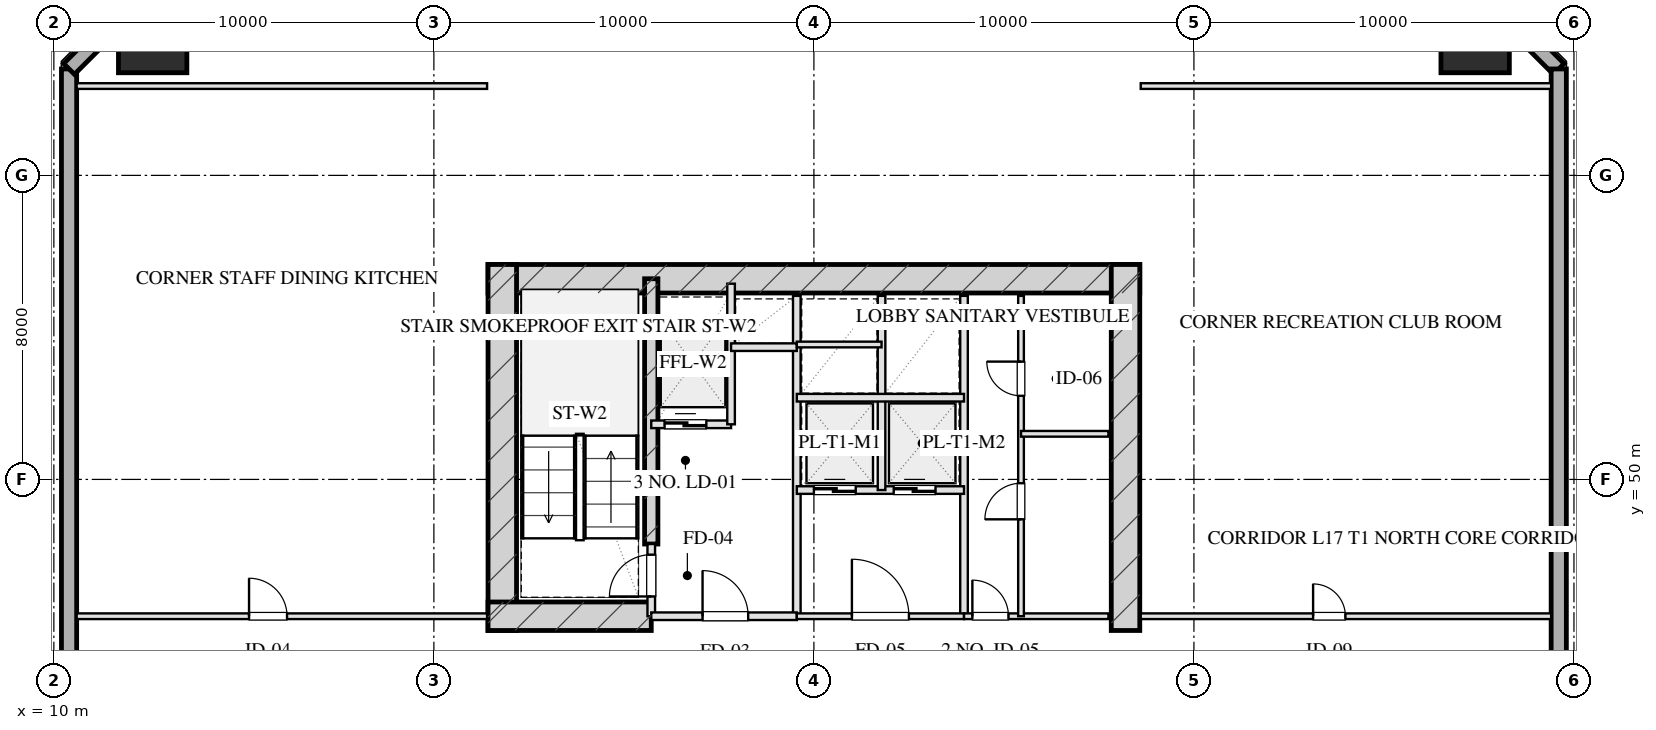
"""IFC4 building model, lengths in metres.
Left out: names, types, materials, properties, quantities, classifications, styles, units other than length and angle.
Written with IfcOpenShell. Run it as: python <this file> out.ifc"""

import sys

from ifc_helpers import new_model, si_unit, direction, frame, frame_2d, origin, origin_2d, place, context, subcontext, project, spatial, rectangle, hollow_rectangle, extrude, element, fill, save


model = new_model("IFC4")
c1 = context("Model", 3, precision=1e-05, world=origin(), true_north=direction((0.0, 1.0)))
c2 = subcontext(c1, "Body", "Model", "MODEL_VIEW")
j1 = project(units=[si_unit("LENGTHUNIT", "METRE"), si_unit("PLANEANGLEUNIT", "RADIAN")], contexts=[c1])
p1 = place(None, origin())
s1 = spatial("IfcSite", under=j1, at=p1, CompositionType="ELEMENT")
p2 = place(p1, origin())
s2 = spatial("IfcBuilding", under=s1, at=p2, CompositionType="ELEMENT")
p3 = place(p2, frame((0.0, 0.0, 71.3)))
s3 = spatial("IfcBuildingStorey", under=s2, at=p3, CompositionType="ELEMENT", Elevation=71.3)
p4 = place(p3, frame((21.425, 55.28, 0.0), z_axis=(0.0, 0.0, 1.0), x_axis=(1.0, 0.0, 0.0)))
e1 = element("IfcWall", 1, at=p4, inside=s3, PredefinedType="SHEAR", context=c2, shape_type="SweptSolid", body=[
    extrude(rectangle(XDim=17.15, YDim=0.75, at=frame_2d((8.575, 0.0))), origin(), (0.0, 0.0, 1.0), 3.45),
])
for number, where, z_axis, x_axis in (
    (2, (21.8, 46.025, 0.0), (0.0, 0.0, 1.0), (0.0, 1.0, 0.0)),
    (3, (38.2, 46.025, 0.0), (0.0, 0.0, 1.0), (0.0, 1.0, 0.0)),
):
    element("IfcWall", number, at=place(p3, frame(where, z_axis=z_axis, x_axis=x_axis)), inside=s3, PredefinedType="SHEAR", context=c2, shape_type="SweptSolid", body=[
        extrude(rectangle(XDim=9.63, YDim=0.75, at=frame_2d((4.815, 0.0))), origin(), (0.0, 0.0, 1.0), 3.45),
    ])
p5 = place(p3, frame((25.72, 48.3, 0.0), z_axis=(0.0, 0.0, 1.0), x_axis=(0.0, 1.0, 0.0)))
e4 = element("IfcWall", 4, at=p5, inside=s3, PredefinedType="SHEAR", context=c2, shape_type="SweptSolid", body=[
    extrude(rectangle(XDim=6.98, YDim=0.35, at=frame_2d((3.49, 0.0))), origin(), (0.0, 0.0, 1.0), 3.45),
])
p6 = place(p3, frame((21.425, 46.4, 0.0), z_axis=(0.0, 0.0, 1.0), x_axis=(1.0, 0.0, 0.0)))
e5 = element("IfcWall", 5, at=p6, inside=s3, PredefinedType="SHEAR", context=c2, shape_type="SweptSolid", body=[
    extrude(rectangle(XDim=4.295, YDim=0.75, at=frame_2d((2.147, 0.0))), origin(), (0.0, 0.0, 1.0), 3.45),
])
for number, where, z_axis, x_axis in (
    (6, (47.4, 61.6, 0.0), (0.0, 0.0, 1.0), (1.0, 0.0, 0.0)),
    (7, (12.6, 61.6, 0.0), (0.0, 0.0, 1.0), (1.0, 0.0, 0.0)),
):
    element("IfcColumn", number, at=place(p3, frame(where, z_axis=z_axis, x_axis=x_axis)), inside=s3, PredefinedType="COLUMN", context=c2, shape_type="SweptSolid", body=[
        extrude(hollow_rectangle(XDim=1.8, YDim=1.8, WallThickness=0.06, at=origin_2d()), origin(), (0.0, 0.0, 1.0), 3.451),
    ])
p7 = place(p3, frame((10.4, 7.2, 0.0), z_axis=(0.0, 0.0, 1.0), x_axis=(0.0, 1.0, 0.0)))
e8 = element("IfcWall", 8, at=p7, inside=s3, PredefinedType="SOLIDWALL", context=c2, shape_type="SweptSolid", body=[
    extrude(rectangle(XDim=53.6, YDim=0.4, at=frame_2d((26.8, 0.0))), origin(), (0.0, 0.0, 1.0), 2.61),
])
p8 = place(p7, frame((19.15, 0.0, 0.75)))
e9 = element("IfcOpeningElement", 9, at=p8, cuts=e8, PredefinedType="OPENING", context=c2, shape_type="SweptSolid", body=[
    extrude(rectangle(XDim=2.5, YDim=1.46, at=frame_2d((1.25, 0.73))), frame((0.0, 0.21, 0.0), z_axis=(0.0, -1.0, 0.0), x_axis=(1.0, 0.0, 0.0)), (0.0, 0.0, 1.0), 0.42),
])
p9 = place(p7, frame((32.05, 0.0, 0.0)))
e10 = element("IfcOpeningElement", 10, at=p9, cuts=e8, PredefinedType="OPENING", context=c2, shape_type="SweptSolid", body=[
    extrude(rectangle(XDim=1.1, YDim=2.15, at=frame_2d((0.55, 1.075))), frame((0.0, 0.21, 0.0), z_axis=(0.0, -1.0, 0.0), x_axis=(1.0, 0.0, 0.0)), (0.0, 0.0, 1.0), 0.42),
])
for number, where, z_axis, x_axis in (
    (11, (10.4, 60.8, 0.0), (0.0, 0.0, 1.0), (0.707, 0.707, 0.0)),
    (12, (46.6, 63.8, 0.0), (0.0, 0.0, 1.0), (0.707, -0.707, 0.0)),
):
    element("IfcWall", number, at=place(p3, frame(where, z_axis=z_axis, x_axis=x_axis)), inside=s3, PredefinedType="SOLIDWALL", context=c2, shape_type="SweptSolid", body=[
        extrude(rectangle(XDim=4.243, YDim=0.4, at=frame_2d((2.121, 0.0))), origin(), (0.0, 0.0, 1.0), 2.61),
    ])
p10 = place(p3, frame((49.6, 60.8, 0.0), z_axis=(0.0, 0.0, 1.0), x_axis=(0.0, -1.0, 0.0)))
e13 = element("IfcWall", 13, at=p10, inside=s3, PredefinedType="SOLIDWALL", context=c2, shape_type="SweptSolid", body=[
    extrude(rectangle(XDim=53.6, YDim=0.4, at=frame_2d((26.8, 0.0))), origin(), (0.0, 0.0, 1.0), 2.61),
])
p11 = place(p10, frame((28.15, 0.0, 0.75)))
e14 = element("IfcOpeningElement", 14, at=p11, cuts=e13, PredefinedType="OPENING", context=c2, shape_type="SweptSolid", body=[
    extrude(rectangle(XDim=2.5, YDim=1.46, at=frame_2d((1.25, 0.73))), frame((0.0, 0.21, 0.0), z_axis=(0.0, -1.0, 0.0), x_axis=(1.0, 0.0, 0.0)), (0.0, 0.0, 1.0), 0.42),
])
p12 = place(p10, frame((23.15, 0.0, 0.0)))
e15 = element("IfcOpeningElement", 15, at=p12, cuts=e13, PredefinedType="OPENING", context=c2, shape_type="SweptSolid", body=[
    extrude(rectangle(XDim=1.1, YDim=2.15, at=frame_2d((0.55, 1.075))), frame((0.0, 0.21, 0.0), z_axis=(0.0, -1.0, 0.0), x_axis=(1.0, 0.0, 0.0)), (0.0, 0.0, 1.0), 0.42),
])
p13 = place(p3, frame((25.72, 46.4, 0.0), z_axis=(0.0, 0.0, 1.0), x_axis=(0.0, 1.0, 0.0)))
e16 = element("IfcWall", 16, at=p13, inside=s3, PredefinedType="PARTITIONING", context=c2, shape_type="SweptSolid", body=[
    extrude(rectangle(XDim=1.9, YDim=0.2, at=frame_2d((0.95, 0.0))), origin(), (0.0, 0.0, 1.0), 3.175),
])
p14 = place(p13, frame((0.52, 0.0, 0.0)))
e17 = element("IfcOpeningElement", 17, at=p14, cuts=e16, PredefinedType="OPENING", context=c2, shape_type="SweptSolid", body=[
    extrude(rectangle(XDim=1.1, YDim=2.05, at=frame_2d((0.55, 1.025))), frame((0.0, 0.11, 0.0), z_axis=(0.0, -1.0, 0.0), x_axis=(1.0, 0.0, 0.0)), (0.0, 0.0, 1.0), 0.22),
])
p15 = place(p3, frame((29.55, 46.4, 0.0), z_axis=(0.0, 0.0, 1.0), x_axis=(0.0, 1.0, 0.0)))
e18 = element("IfcWall", 18, at=p15, inside=s3, PredefinedType="PARTITIONING", context=c2, shape_type="SweptSolid", body=[
    extrude(rectangle(XDim=8.43, YDim=0.2, at=frame_2d((4.215, 0.0))), origin(), (0.0, 0.0, 1.0), 3.175),
])
p16 = place(p3, frame((25.72, 46.4, 0.0), z_axis=(0.0, 0.0, 1.0), x_axis=(1.0, 0.0, 0.0)))
e19 = element("IfcWall", 19, at=p16, inside=s3, PredefinedType="PARTITIONING", context=c2, shape_type="SweptSolid", body=[
    extrude(rectangle(XDim=3.83, YDim=0.2, at=frame_2d((1.915, 0.0))), origin(), (0.0, 0.0, 1.0), 3.175),
])
p17 = place(p16, frame((1.35, 0.0, 0.0)))
e20 = element("IfcOpeningElement", 20, at=p17, cuts=e19, PredefinedType="OPENING", context=c2, shape_type="SweptSolid", body=[
    extrude(rectangle(XDim=1.2, YDim=2.05, at=frame_2d((0.6, 1.025))), frame((0.0, 0.11, 0.0), z_axis=(0.0, -1.0, 0.0), x_axis=(1.0, 0.0, 0.0)), (0.0, 0.0, 1.0), 0.22),
])
p18 = place(p3, frame((25.72, 51.45, 0.0), z_axis=(0.0, 0.0, 1.0), x_axis=(1.0, 0.0, 0.0)))
e21 = element("IfcWall", 21, at=p18, inside=s3, PredefinedType="PARTITIONING", context=c2, shape_type="SweptSolid", body=[
    extrude(rectangle(XDim=2.1, YDim=0.2, at=frame_2d((1.05, 0.0))), origin(), (0.0, 0.0, 1.0), 3.175),
])
p19 = place(p18, frame((0.35, 0.0, 0.0)))
e22 = element("IfcOpeningElement", 22, at=p19, cuts=e21, PredefinedType="OPENING", context=c2, shape_type="SweptSolid", body=[
    extrude(rectangle(XDim=1.1, YDim=2.05, at=frame_2d((0.55, 1.025))), frame((0.0, 0.11, 0.0), z_axis=(0.0, -1.0, 0.0), x_axis=(1.0, 0.0, 0.0)), (0.0, 0.0, 1.0), 0.22),
])
p20 = place(p3, frame((27.82, 51.45, 0.0), z_axis=(0.0, 0.0, 1.0), x_axis=(0.0, 1.0, 0.0)))
e23 = element("IfcWall", 23, at=p20, inside=s3, PredefinedType="PARTITIONING", context=c2, shape_type="SweptSolid", body=[
    extrude(rectangle(XDim=3.7, YDim=0.2, at=frame_2d((1.85, 0.0))), origin(), (0.0, 0.0, 1.0), 3.175),
])
p21 = place(p3, frame((27.82, 53.48, 0.0), z_axis=(0.0, 0.0, 1.0), x_axis=(1.0, 0.0, 0.0)))
e24 = element("IfcWall", 24, at=p21, inside=s3, PredefinedType="PARTITIONING", context=c2, shape_type="SweptSolid", body=[
    extrude(rectangle(XDim=1.73, YDim=0.2, at=frame_2d((0.865, 0.0))), origin(), (0.0, 0.0, 1.0), 3.175),
])
p22 = place(p3, frame((33.95, 46.4, 0.0), z_axis=(0.0, 0.0, 1.0), x_axis=(0.0, 1.0, 0.0)))
e25 = element("IfcWall", 25, at=p22, inside=s3, PredefinedType="PARTITIONING", context=c2, shape_type="SweptSolid", body=[
    extrude(rectangle(XDim=8.43, YDim=0.2, at=frame_2d((4.215, 0.0))), origin(), (0.0, 0.0, 1.0), 3.175),
])
p23 = place(p3, frame((29.55, 46.4, 0.0), z_axis=(0.0, 0.0, 1.0), x_axis=(1.0, 0.0, 0.0)))
e26 = element("IfcWall", 26, at=p23, inside=s3, PredefinedType="PARTITIONING", context=c2, shape_type="SweptSolid", body=[
    extrude(rectangle(XDim=4.4, YDim=0.15, at=frame_2d((2.2, 0.0))), origin(), (0.0, 0.0, 1.0), 3.175),
])
p24 = place(p23, frame((1.45, 0.0, 0.0)))
e27 = element("IfcOpeningElement", 27, at=p24, cuts=e26, PredefinedType="OPENING", context=c2, shape_type="SweptSolid", body=[
    extrude(rectangle(XDim=1.5, YDim=2.05, at=frame_2d((0.75, 1.025))), frame((0.0, 0.085, 0.0), z_axis=(0.0, -1.0, 0.0), x_axis=(1.0, 0.0, 0.0)), (0.0, 0.0, 1.0), 0.17),
])
p25 = place(p3, frame((29.55, 49.72, 0.0), z_axis=(0.0, 0.0, 1.0), x_axis=(1.0, 0.0, 0.0)))
e28 = element("IfcWall", 28, at=p25, inside=s3, PredefinedType="PARTITIONING", context=c2, shape_type="SweptSolid", body=[
    extrude(rectangle(XDim=4.4, YDim=0.2, at=frame_2d((2.2, 0.0))), origin(), (0.0, 0.0, 1.0), 3.175),
])
p26 = place(p25, frame((0.45, 0.0, 0.0)))
e29 = element("IfcOpeningElement", 29, at=p26, cuts=e28, PredefinedType="OPENING", context=c2, shape_type="SweptSolid", body=[
    extrude(rectangle(XDim=1.1, YDim=2.05, at=frame_2d((0.55, 1.025))), frame((0.0, 0.11, 0.0), z_axis=(0.0, -1.0, 0.0), x_axis=(1.0, 0.0, 0.0)), (0.0, 0.0, 1.0), 0.22),
])
p27 = place(p25, frame((2.55, 0.0, 0.0)))
e30 = element("IfcOpeningElement", 30, at=p27, cuts=e28, PredefinedType="OPENING", context=c2, shape_type="SweptSolid", body=[
    extrude(rectangle(XDim=1.1, YDim=2.05, at=frame_2d((0.55, 1.025))), frame((0.0, 0.11, 0.0), z_axis=(0.0, -1.0, 0.0), x_axis=(1.0, 0.0, 0.0)), (0.0, 0.0, 1.0), 0.22),
])
p28 = place(p3, frame((31.78, 49.72, 0.0), z_axis=(0.0, 0.0, 1.0), x_axis=(0.0, 1.0, 0.0)))
e31 = element("IfcWall", 31, at=p28, inside=s3, PredefinedType="PARTITIONING", context=c2, shape_type="SweptSolid", body=[
    extrude(rectangle(XDim=5.11, YDim=0.2, at=frame_2d((2.555, 0.0))), origin(), (0.0, 0.0, 1.0), 3.175),
])
p29 = place(p3, frame((29.55, 52.15, 0.0), z_axis=(0.0, 0.0, 1.0), x_axis=(1.0, 0.0, 0.0)))
e32 = element("IfcWall", 32, at=p29, inside=s3, PredefinedType="PARTITIONING", context=c2, shape_type="SweptSolid", body=[
    extrude(rectangle(XDim=4.4, YDim=0.2, at=frame_2d((2.2, 0.0))), origin(), (0.0, 0.0, 1.0), 3.175),
])
p30 = place(p3, frame((29.55, 53.55, 0.0), z_axis=(0.0, 0.0, 1.0), x_axis=(1.0, 0.0, 0.0)))
e33 = element("IfcWall", 33, at=p30, inside=s3, PredefinedType="PARTITIONING", context=c2, shape_type="SweptSolid", body=[
    extrude(rectangle(XDim=2.23, YDim=0.15, at=frame_2d((1.115, 0.0))), origin(), (0.0, 0.0, 1.0), 3.175),
])
p31 = place(p3, frame((33.95, 46.4, 0.0), z_axis=(0.0, 0.0, 1.0), x_axis=(1.0, 0.0, 0.0)))
e34 = element("IfcWall", 34, at=p31, inside=s3, PredefinedType="PARTITIONING", context=c2, shape_type="SweptSolid", body=[
    extrude(rectangle(XDim=3.8, YDim=0.15, at=frame_2d((1.9, 0.0))), origin(), (0.0, 0.0, 1.0), 3.175),
])
p32 = place(p31, frame((0.22, 0.0, 0.0)))
e35 = element("IfcOpeningElement", 35, at=p32, cuts=e34, PredefinedType="OPENING", context=c2, shape_type="SweptSolid", body=[
    extrude(rectangle(XDim=0.95, YDim=2.05, at=frame_2d((0.475, 1.025))), frame((0.0, 0.085, 0.0), z_axis=(0.0, -1.0, 0.0), x_axis=(1.0, 0.0, 0.0)), (0.0, 0.0, 1.0), 0.17),
])
p33 = place(p3, frame((35.45, 46.4, 0.0), z_axis=(0.0, 0.0, 1.0), x_axis=(0.0, 1.0, 0.0)))
e36 = element("IfcWall", 36, at=p33, inside=s3, PredefinedType="PARTITIONING", context=c2, shape_type="SweptSolid", body=[
    extrude(rectangle(XDim=8.43, YDim=0.15, at=frame_2d((4.215, 0.0))), origin(), (0.0, 0.0, 1.0), 2.815),
])
p34 = place(p33, frame((2.55, 0.0, 0.0)))
e37 = element("IfcOpeningElement", 37, at=p34, cuts=e36, PredefinedType="OPENING", context=c2, shape_type="SweptSolid", body=[
    extrude(rectangle(XDim=0.95, YDim=2.05, at=frame_2d((0.475, 1.025))), frame((0.0, 0.085, 0.0), z_axis=(0.0, -1.0, 0.0), x_axis=(1.0, 0.0, 0.0)), (0.0, 0.0, 1.0), 0.17),
])
p35 = place(p33, frame((5.8, 0.0, 0.0)))
e38 = element("IfcOpeningElement", 38, at=p35, cuts=e36, PredefinedType="OPENING", context=c2, shape_type="SweptSolid", body=[
    extrude(rectangle(XDim=0.9, YDim=2.05, at=frame_2d((0.45, 1.025))), frame((0.0, 0.085, 0.0), z_axis=(0.0, -1.0, 0.0), x_axis=(1.0, 0.0, 0.0)), (0.0, 0.0, 1.0), 0.17),
])
p36 = place(p3, frame((35.45, 51.2, 0.0), z_axis=(0.0, 0.0, 1.0), x_axis=(1.0, 0.0, 0.0)))
e39 = element("IfcWall", 39, at=p36, inside=s3, PredefinedType="PARTITIONING", context=c2, shape_type="SweptSolid", body=[
    extrude(rectangle(XDim=2.3, YDim=0.15, at=frame_2d((1.15, 0.0))), origin(), (0.0, 0.0, 1.0), 3.175),
])
p37 = place(p3, frame((10.6, 60.35, 0.0), z_axis=(0.0, 0.0, 1.0), x_axis=(1.0, 0.0, 0.0)))
e40 = element("IfcWall", 40, at=p37, inside=s3, PredefinedType="PARTITIONING", context=c2, shape_type="SweptSolid", body=[
    extrude(rectangle(XDim=10.8, YDim=0.15, at=frame_2d((5.4, 0.0))), origin(), (0.0, 0.0, 1.0), 3.175),
])
p38 = place(p3, frame((10.6, 46.4, 0.0), z_axis=(0.0, 0.0, 1.0), x_axis=(1.0, 0.0, 0.0)))
e41 = element("IfcWall", 41, at=p38, inside=s3, PredefinedType="PARTITIONING", context=c2, shape_type="SweptSolid", body=[
    extrude(rectangle(XDim=10.8, YDim=0.15, at=frame_2d((5.4, 0.0))), origin(), (0.0, 0.0, 1.0), 3.175),
])
p39 = place(p38, frame((4.536, 0.0, 0.0)))
e42 = element("IfcOpeningElement", 42, at=p39, cuts=e41, PredefinedType="OPENING", context=c2, shape_type="SweptSolid", body=[
    extrude(rectangle(XDim=1.0, YDim=2.05, at=frame_2d((0.5, 1.025))), frame((0.0, 0.085, 0.0), z_axis=(0.0, -1.0, 0.0), x_axis=(1.0, 0.0, 0.0)), (0.0, 0.0, 1.0), 0.17),
])
p40 = place(p3, frame((38.6, 60.35, 0.0), z_axis=(0.0, 0.0, 1.0), x_axis=(1.0, 0.0, 0.0)))
e43 = element("IfcWall", 43, at=p40, inside=s3, PredefinedType="PARTITIONING", context=c2, shape_type="SweptSolid", body=[
    extrude(rectangle(XDim=10.8, YDim=0.15, at=frame_2d((5.4, 0.0))), origin(), (0.0, 0.0, 1.0), 3.175),
])
p41 = place(p3, frame((38.6, 46.4, 0.0), z_axis=(0.0, 0.0, 1.0), x_axis=(1.0, 0.0, 0.0)))
e44 = element("IfcWall", 44, at=p41, inside=s3, PredefinedType="PARTITIONING", context=c2, shape_type="SweptSolid", body=[
    extrude(rectangle(XDim=10.8, YDim=0.15, at=frame_2d((5.4, 0.0))), origin(), (0.0, 0.0, 1.0), 3.175),
])
p42 = place(p41, frame((4.536, 0.0, 0.0)))
e45 = element("IfcOpeningElement", 45, at=p42, cuts=e44, PredefinedType="OPENING", context=c2, shape_type="SweptSolid", body=[
    extrude(rectangle(XDim=0.85, YDim=2.05, at=frame_2d((0.425, 1.025))), frame((0.0, 0.085, 0.0), z_axis=(0.0, -1.0, 0.0), x_axis=(1.0, 0.0, 0.0)), (0.0, 0.0, 1.0), 0.17),
])
p43 = place(p14, origin())
e46 = element("IfcDoor", 46, at=p43, inside=s3, OperationType="SINGLE_SWING_LEFT", PredefinedType="DOOR", context=c2, shape_type="SweptSolid", body=[
    extrude(rectangle(XDim=1.1, YDim=2.05, at=frame_2d((0.55, 1.025))), frame((0.0, 0.025, 0.0), z_axis=(0.0, -1.0, 0.0), x_axis=(1.0, 0.0, 0.0)), (0.0, 0.0, 1.0), 0.05),
])
fill(e17, e46)
p44 = place(p17, origin())
e47 = element("IfcDoor", 47, at=p44, inside=s3, OperationType="SINGLE_SWING_LEFT", PredefinedType="DOOR", context=c2, shape_type="SweptSolid", body=[
    extrude(rectangle(XDim=1.2, YDim=2.05, at=frame_2d((0.6, 1.025))), frame((0.0, 0.025, 0.0), z_axis=(0.0, -1.0, 0.0), x_axis=(1.0, 0.0, 0.0)), (0.0, 0.0, 1.0), 0.05),
])
fill(e20, e47)
p45 = place(p19, origin())
e48 = element("IfcDoor", 48, at=p45, inside=s3, OperationType="DOUBLE_DOOR_SLIDING", PredefinedType="DOOR", context=c2, shape_type="SweptSolid", body=[
    extrude(rectangle(XDim=1.1, YDim=2.05, at=frame_2d((0.55, 1.025))), frame((0.0, 0.025, 0.0), z_axis=(0.0, -1.0, 0.0), x_axis=(1.0, 0.0, 0.0)), (0.0, 0.0, 1.0), 0.05),
])
fill(e22, e48)
p46 = place(p24, origin())
e49 = element("IfcDoor", 49, at=p46, inside=s3, OperationType="SINGLE_SWING_LEFT", PredefinedType="DOOR", context=c2, shape_type="SweptSolid", body=[
    extrude(rectangle(XDim=1.5, YDim=2.05, at=frame_2d((0.75, 1.025))), frame((0.0, 0.025, 0.0), z_axis=(0.0, -1.0, 0.0), x_axis=(1.0, 0.0, 0.0)), (0.0, 0.0, 1.0), 0.05),
])
fill(e27, e49)
p47 = place(p26, origin())
e50 = element("IfcDoor", 50, at=p47, inside=s3, OperationType="DOUBLE_DOOR_SLIDING", PredefinedType="DOOR", context=c2, shape_type="SweptSolid", body=[
    extrude(rectangle(XDim=1.1, YDim=2.05, at=frame_2d((0.55, 1.025))), frame((0.0, 0.025, 0.0), z_axis=(0.0, -1.0, 0.0), x_axis=(1.0, 0.0, 0.0)), (0.0, 0.0, 1.0), 0.05),
])
fill(e29, e50)
p48 = place(p27, origin())
e51 = element("IfcDoor", 51, at=p48, inside=s3, OperationType="DOUBLE_DOOR_SLIDING", PredefinedType="DOOR", context=c2, shape_type="SweptSolid", body=[
    extrude(rectangle(XDim=1.1, YDim=2.05, at=frame_2d((0.55, 1.025))), frame((0.0, 0.025, 0.0), z_axis=(0.0, -1.0, 0.0), x_axis=(1.0, 0.0, 0.0)), (0.0, 0.0, 1.0), 0.05),
])
fill(e30, e51)
p49 = place(p32, origin())
e52 = element("IfcDoor", 52, at=p49, inside=s3, OperationType="SINGLE_SWING_LEFT", PredefinedType="DOOR", context=c2, shape_type="SweptSolid", body=[
    extrude(rectangle(XDim=0.95, YDim=2.05, at=frame_2d((0.475, 1.025))), frame((0.0, 0.025, 0.0), z_axis=(0.0, -1.0, 0.0), x_axis=(1.0, 0.0, 0.0)), (0.0, 0.0, 1.0), 0.05),
])
fill(e35, e52)
p50 = place(p34, origin())
e53 = element("IfcDoor", 53, at=p50, inside=s3, OperationType="SINGLE_SWING_LEFT", PredefinedType="DOOR", context=c2, shape_type="SweptSolid", body=[
    extrude(rectangle(XDim=0.95, YDim=2.05, at=frame_2d((0.475, 1.025))), frame((0.0, 0.025, 0.0), z_axis=(0.0, -1.0, 0.0), x_axis=(1.0, 0.0, 0.0)), (0.0, 0.0, 1.0), 0.05),
])
fill(e37, e53)
p51 = place(p35, origin())
e54 = element("IfcDoor", 54, at=p51, inside=s3, OperationType="SINGLE_SWING_RIGHT", PredefinedType="DOOR", context=c2, shape_type="SweptSolid", body=[
    extrude(rectangle(XDim=0.9, YDim=2.05, at=frame_2d((0.45, 1.025))), frame((0.0, 0.025, 0.0), z_axis=(0.0, -1.0, 0.0), x_axis=(1.0, 0.0, 0.0)), (0.0, 0.0, 1.0), 0.05),
])
fill(e38, e54)
p52 = place(p39, origin())
e55 = element("IfcDoor", 55, at=p52, inside=s3, OperationType="SINGLE_SWING_LEFT", PredefinedType="DOOR", context=c2, shape_type="SweptSolid", body=[
    extrude(rectangle(XDim=1.0, YDim=2.05, at=frame_2d((0.5, 1.025))), frame((0.0, 0.025, 0.0), z_axis=(0.0, -1.0, 0.0), x_axis=(1.0, 0.0, 0.0)), (0.0, 0.0, 1.0), 0.05),
])
fill(e42, e55)
p53 = place(p42, origin())
e56 = element("IfcDoor", 56, at=p53, inside=s3, OperationType="SINGLE_SWING_LEFT", PredefinedType="DOOR", context=c2, shape_type="SweptSolid", body=[
    extrude(rectangle(XDim=0.85, YDim=2.05, at=frame_2d((0.425, 1.025))), frame((0.0, 0.025, 0.0), z_axis=(0.0, -1.0, 0.0), x_axis=(1.0, 0.0, 0.0)), (0.0, 0.0, 1.0), 0.05),
])
fill(e45, e56)
save(model, sys.argv[1])
